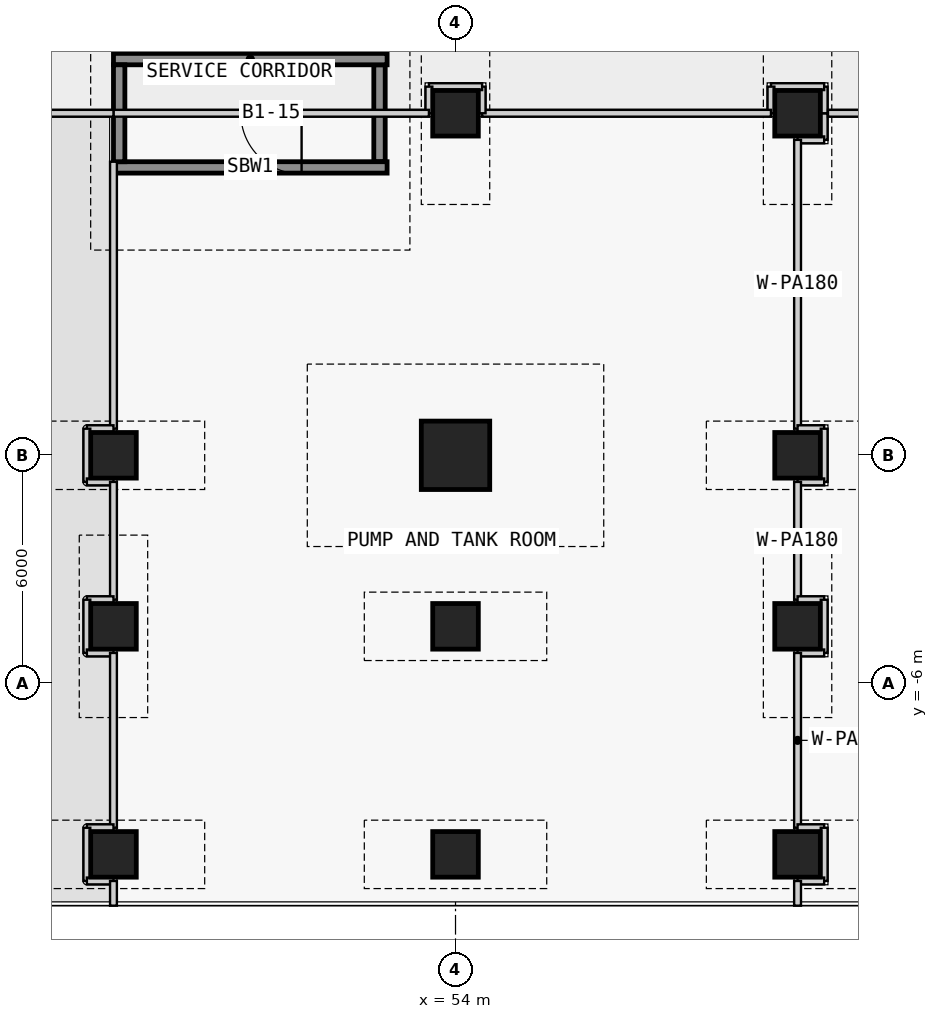
"""IFC4 building model, lengths in metres.
Left out: names, types, materials, properties, quantities, classifications, styles, units other than length and angle.
Written with IfcOpenShell. Run it as: python <this file> out.ifc"""

import sys

from ifc_helpers import new_model, si_unit, direction, frame, frame_2d, origin, origin_2d, place, context, subcontext, project, spatial, rectangle, extrude, element, fill, save


model = new_model("IFC4")
c1 = context("Model", 3, precision=1e-05, world=origin(), true_north=direction((0.0, 1.0)))
c2 = subcontext(c1, "Body", "Model", "MODEL_VIEW")
j1 = project(units=[si_unit("LENGTHUNIT", "METRE"), si_unit("PLANEANGLEUNIT", "RADIAN")], contexts=[c1])
p1 = place(None, origin())
s1 = spatial("IfcSite", under=j1, at=p1, CompositionType="ELEMENT")
p2 = place(p1, origin())
s2 = spatial("IfcBuilding", under=s1, at=p2, CompositionType="ELEMENT")
p3 = place(p2, frame((0.0, 0.0, -7.0)))
s3 = spatial("IfcBuildingStorey", under=s2, at=p3, CompositionType="ELEMENT", Elevation=-7.0)
for number, where, z_axis, x_axis in (
    (1, (45.0, -10.5, 0.0), (0.0, 0.0, 1.0), (1.0, 0.0, 0.0)),
    (2, (45.0, -4.5, 0.0), (0.0, 0.0, 1.0), (1.0, 0.0, 0.0)),
    (3, (45.0, 0.0, 0.0), (0.0, 0.0, 1.0), (1.0, 0.0, 0.0)),
    (4, (54.0, -10.5, 0.0), (0.0, 0.0, 1.0), (1.0, 0.0, 0.0)),
    (5, (54.0, -4.5, 0.0), (0.0, 0.0, 1.0), (1.0, 0.0, 0.0)),
):
    element("IfcColumn", number, at=place(p3, frame(where, z_axis=z_axis, x_axis=x_axis)), inside=s3, PredefinedType="COLUMN", context=c2, shape_type="SweptSolid", body=[
        extrude(rectangle(XDim=1.2, YDim=1.2, at=origin_2d()), origin(), (0.0, 0.0, 1.0), 7.0),
    ])
p4 = place(p3, frame((54.0, 0.0, 0.0), z_axis=(0.0, 0.0, 1.0), x_axis=(1.0, 0.0, 0.0)))
e6 = element("IfcColumn", 6, at=p4, inside=s3, PredefinedType="COLUMN", context=c2, shape_type="SweptSolid", body=[
    extrude(rectangle(XDim=1.8, YDim=1.8, at=origin_2d()), origin(), (0.0, 0.0, 1.0), 7.0),
])
for number, where, z_axis, x_axis in (
    (7, (54.0, 9.0, 0.0), (0.0, 0.0, 1.0), (1.0, 0.0, 0.0)),
    (8, (63.0, -10.5, 0.0), (0.0, 0.0, 1.0), (1.0, 0.0, 0.0)),
    (9, (63.0, -4.5, 0.0), (0.0, 0.0, 1.0), (1.0, 0.0, 0.0)),
    (10, (63.0, 0.0, 0.0), (0.0, 0.0, 1.0), (1.0, 0.0, 0.0)),
    (11, (63.0, 9.0, 0.0), (0.0, 0.0, 1.0), (1.0, 0.0, 0.0)),
):
    element("IfcColumn", number, at=place(p3, frame(where, z_axis=z_axis, x_axis=x_axis)), inside=s3, PredefinedType="COLUMN", context=c2, shape_type="SweptSolid", body=[
        extrude(rectangle(XDim=1.2, YDim=1.2, at=origin_2d()), origin(), (0.0, 0.0, 1.0), 7.0),
    ])
for number, where, z_axis, x_axis in (
    (12, (45.15, 7.725, 0.0), (0.0, 0.0, 1.0), (0.0, 1.0, 0.0)),
    (13, (52.0, 7.725, 0.0), (0.0, 0.0, 1.0), (0.0, 1.0, 0.0)),
):
    element("IfcWall", number, at=place(p3, frame(where, z_axis=z_axis, x_axis=x_axis)), inside=s3, PredefinedType="SHEAR", context=c2, shape_type="SweptSolid", body=[
        extrude(rectangle(XDim=2.55, YDim=0.3, at=frame_2d((1.275, 0.0))), origin(), (0.0, 0.0, 1.0), 6.55),
    ])
for number, where, z_axis, x_axis in (
    (14, (45.0, 7.575, 0.0), (0.0, 0.0, 1.0), (1.0, 0.0, 0.0)),
    (15, (45.0, 10.425, 0.0), (0.0, 0.0, 1.0), (1.0, 0.0, 0.0)),
):
    element("IfcWall", number, at=place(p3, frame(where, z_axis=z_axis, x_axis=x_axis)), inside=s3, PredefinedType="SHEAR", context=c2, shape_type="SweptSolid", body=[
        extrude(rectangle(XDim=7.2, YDim=0.3, at=frame_2d((3.6, 0.0))), origin(), (0.0, 0.0, 1.0), 6.55),
    ])
for number, where, z_axis, x_axis in (
    (16, (63.7, 9.0, 0.0), (0.0, 0.0, 1.0), (0.0, -1.0, 0.0)),
    (17, (63.7, 8.3, 0.0), (0.0, 0.0, 1.0), (-1.0, 0.0, 0.0)),
):
    element("IfcWall", number, at=place(p3, frame(where, z_axis=z_axis, x_axis=x_axis)), inside=s3, PredefinedType="PARTITIONING", context=c2, shape_type="SweptSolid", body=[
        extrude(rectangle(XDim=0.7, YDim=0.18, at=frame_2d((0.35, 0.0))), origin(), (0.0, 0.0, 1.0), 6.55),
    ])
p5 = place(p3, frame((63.0, 8.3, 0.0), z_axis=(0.0, 0.0, 1.0), x_axis=(0.0, -1.0, 0.0)))
e18 = element("IfcWall", 18, at=p5, inside=s3, PredefinedType="PARTITIONING", context=c2, shape_type="SweptSolid", body=[
    extrude(rectangle(XDim=7.6, YDim=0.18, at=frame_2d((3.8, 0.0))), origin(), (0.0, 0.0, 1.0), 6.55),
])
p6 = place(p3, frame((63.0, 0.7, 0.0), z_axis=(0.0, 0.0, 1.0), x_axis=(1.0, 0.0, 0.0)))
e19 = element("IfcWall", 19, at=p6, inside=s3, PredefinedType="PARTITIONING", context=c2, shape_type="SweptSolid", body=[
    extrude(rectangle(XDim=0.7, YDim=0.18, at=frame_2d((0.35, 0.0))), origin(), (0.0, 0.0, 1.0), 6.55),
])
p7 = place(p3, frame((63.7, 0.7, 0.0), z_axis=(0.0, 0.0, 1.0), x_axis=(0.0, -1.0, 0.0)))
e20 = element("IfcWall", 20, at=p7, inside=s3, PredefinedType="PARTITIONING", context=c2, shape_type="SweptSolid", body=[
    extrude(rectangle(XDim=1.4, YDim=0.18, at=frame_2d((0.7, 0.0))), origin(), (0.0, 0.0, 1.0), 6.55),
])
p8 = place(p3, frame((63.7, -0.7, 0.0), z_axis=(0.0, 0.0, 1.0), x_axis=(-1.0, 0.0, 0.0)))
e21 = element("IfcWall", 21, at=p8, inside=s3, PredefinedType="PARTITIONING", context=c2, shape_type="SweptSolid", body=[
    extrude(rectangle(XDim=0.7, YDim=0.18, at=frame_2d((0.35, 0.0))), origin(), (0.0, 0.0, 1.0), 6.55),
])
p9 = place(p3, frame((63.0, -0.7, 0.0), z_axis=(0.0, 0.0, 1.0), x_axis=(0.0, -1.0, 0.0)))
e22 = element("IfcWall", 22, at=p9, inside=s3, PredefinedType="PARTITIONING", context=c2, shape_type="SweptSolid", body=[
    extrude(rectangle(XDim=3.1, YDim=0.18, at=frame_2d((1.55, 0.0))), origin(), (0.0, 0.0, 1.0), 6.55),
])
p10 = place(p3, frame((63.0, -3.8, 0.0), z_axis=(0.0, 0.0, 1.0), x_axis=(1.0, 0.0, 0.0)))
e23 = element("IfcWall", 23, at=p10, inside=s3, PredefinedType="PARTITIONING", context=c2, shape_type="SweptSolid", body=[
    extrude(rectangle(XDim=0.7, YDim=0.18, at=frame_2d((0.35, 0.0))), origin(), (0.0, 0.0, 1.0), 6.55),
])
p11 = place(p3, frame((63.7, -3.8, 0.0), z_axis=(0.0, 0.0, 1.0), x_axis=(0.0, -1.0, 0.0)))
e24 = element("IfcWall", 24, at=p11, inside=s3, PredefinedType="PARTITIONING", context=c2, shape_type="SweptSolid", body=[
    extrude(rectangle(XDim=1.4, YDim=0.18, at=frame_2d((0.7, 0.0))), origin(), (0.0, 0.0, 1.0), 6.55),
])
p12 = place(p3, frame((63.7, -5.2, 0.0), z_axis=(0.0, 0.0, 1.0), x_axis=(-1.0, 0.0, 0.0)))
e25 = element("IfcWall", 25, at=p12, inside=s3, PredefinedType="PARTITIONING", context=c2, shape_type="SweptSolid", body=[
    extrude(rectangle(XDim=0.7, YDim=0.18, at=frame_2d((0.35, 0.0))), origin(), (0.0, 0.0, 1.0), 6.55),
])
p13 = place(p3, frame((63.0, -5.2, 0.0), z_axis=(0.0, 0.0, 1.0), x_axis=(0.0, -1.0, 0.0)))
e26 = element("IfcWall", 26, at=p13, inside=s3, PredefinedType="PARTITIONING", context=c2, shape_type="SweptSolid", body=[
    extrude(rectangle(XDim=4.6, YDim=0.18, at=frame_2d((2.3, 0.0))), origin(), (0.0, 0.0, 1.0), 6.55),
])
p14 = place(p3, frame((63.0, -9.8, 0.0), z_axis=(0.0, 0.0, 1.0), x_axis=(1.0, 0.0, 0.0)))
e27 = element("IfcWall", 27, at=p14, inside=s3, PredefinedType="PARTITIONING", context=c2, shape_type="SweptSolid", body=[
    extrude(rectangle(XDim=0.7, YDim=0.18, at=frame_2d((0.35, 0.0))), origin(), (0.0, 0.0, 1.0), 6.55),
])
p15 = place(p3, frame((63.7, -9.8, 0.0), z_axis=(0.0, 0.0, 1.0), x_axis=(0.0, -1.0, 0.0)))
e28 = element("IfcWall", 28, at=p15, inside=s3, PredefinedType="PARTITIONING", context=c2, shape_type="SweptSolid", body=[
    extrude(rectangle(XDim=1.4, YDim=0.18, at=frame_2d((0.7, 0.0))), origin(), (0.0, 0.0, 1.0), 6.55),
])
p16 = place(p3, frame((63.7, -11.2, 0.0), z_axis=(0.0, 0.0, 1.0), x_axis=(-1.0, 0.0, 0.0)))
e29 = element("IfcWall", 29, at=p16, inside=s3, PredefinedType="PARTITIONING", context=c2, shape_type="SweptSolid", body=[
    extrude(rectangle(XDim=0.7, YDim=0.18, at=frame_2d((0.35, 0.0))), origin(), (0.0, 0.0, 1.0), 6.55),
])
p17 = place(p3, frame((63.0, -11.2, 0.0), z_axis=(0.0, 0.0, 1.0), x_axis=(0.0, -1.0, 0.0)))
e30 = element("IfcWall", 30, at=p17, inside=s3, PredefinedType="PARTITIONING", context=c2, shape_type="SweptSolid", body=[
    extrude(rectangle(XDim=0.65, YDim=0.18, at=frame_2d((0.325, 0.0))), origin(), (0.0, 0.0, 1.0), 6.55),
])
p18 = place(p3, frame((45.0, 7.725, 0.0), z_axis=(0.0, 0.0, 1.0), x_axis=(0.0, -1.0, 0.0)))
e31 = element("IfcWall", 31, at=p18, inside=s3, PredefinedType="PARTITIONING", context=c2, shape_type="SweptSolid", body=[
    extrude(rectangle(XDim=7.025, YDim=0.18, at=frame_2d((3.513, 0.0))), origin(), (0.0, 0.0, 1.0), 6.55),
])
p19 = place(p3, frame((45.0, 0.7, 0.0), z_axis=(0.0, 0.0, 1.0), x_axis=(-1.0, 0.0, 0.0)))
e32 = element("IfcWall", 32, at=p19, inside=s3, PredefinedType="PARTITIONING", context=c2, shape_type="SweptSolid", body=[
    extrude(rectangle(XDim=0.7, YDim=0.18, at=frame_2d((0.35, 0.0))), origin(), (0.0, 0.0, 1.0), 6.55),
])
p20 = place(p3, frame((44.3, 0.7, 0.0), z_axis=(0.0, 0.0, 1.0), x_axis=(0.0, -1.0, 0.0)))
e33 = element("IfcWall", 33, at=p20, inside=s3, PredefinedType="PARTITIONING", context=c2, shape_type="SweptSolid", body=[
    extrude(rectangle(XDim=1.4, YDim=0.18, at=frame_2d((0.7, 0.0))), origin(), (0.0, 0.0, 1.0), 6.55),
])
p21 = place(p3, frame((44.3, -0.7, 0.0), z_axis=(0.0, 0.0, 1.0), x_axis=(1.0, 0.0, 0.0)))
e34 = element("IfcWall", 34, at=p21, inside=s3, PredefinedType="PARTITIONING", context=c2, shape_type="SweptSolid", body=[
    extrude(rectangle(XDim=0.7, YDim=0.18, at=frame_2d((0.35, 0.0))), origin(), (0.0, 0.0, 1.0), 6.55),
])
p22 = place(p3, frame((45.0, -0.7, 0.0), z_axis=(0.0, 0.0, 1.0), x_axis=(0.0, -1.0, 0.0)))
e35 = element("IfcWall", 35, at=p22, inside=s3, PredefinedType="PARTITIONING", context=c2, shape_type="SweptSolid", body=[
    extrude(rectangle(XDim=3.1, YDim=0.18, at=frame_2d((1.55, 0.0))), origin(), (0.0, 0.0, 1.0), 6.55),
])
p23 = place(p3, frame((45.0, -3.8, 0.0), z_axis=(0.0, 0.0, 1.0), x_axis=(-1.0, 0.0, 0.0)))
e36 = element("IfcWall", 36, at=p23, inside=s3, PredefinedType="PARTITIONING", context=c2, shape_type="SweptSolid", body=[
    extrude(rectangle(XDim=0.7, YDim=0.18, at=frame_2d((0.35, 0.0))), origin(), (0.0, 0.0, 1.0), 6.55),
])
p24 = place(p3, frame((44.3, -3.8, 0.0), z_axis=(0.0, 0.0, 1.0), x_axis=(0.0, -1.0, 0.0)))
e37 = element("IfcWall", 37, at=p24, inside=s3, PredefinedType="PARTITIONING", context=c2, shape_type="SweptSolid", body=[
    extrude(rectangle(XDim=1.4, YDim=0.18, at=frame_2d((0.7, 0.0))), origin(), (0.0, 0.0, 1.0), 6.55),
])
p25 = place(p3, frame((44.3, -5.2, 0.0), z_axis=(0.0, 0.0, 1.0), x_axis=(1.0, 0.0, 0.0)))
e38 = element("IfcWall", 38, at=p25, inside=s3, PredefinedType="PARTITIONING", context=c2, shape_type="SweptSolid", body=[
    extrude(rectangle(XDim=0.7, YDim=0.18, at=frame_2d((0.35, 0.0))), origin(), (0.0, 0.0, 1.0), 6.55),
])
p26 = place(p3, frame((45.0, -5.2, 0.0), z_axis=(0.0, 0.0, 1.0), x_axis=(0.0, -1.0, 0.0)))
e39 = element("IfcWall", 39, at=p26, inside=s3, PredefinedType="PARTITIONING", context=c2, shape_type="SweptSolid", body=[
    extrude(rectangle(XDim=4.6, YDim=0.18, at=frame_2d((2.3, 0.0))), origin(), (0.0, 0.0, 1.0), 6.55),
])
p27 = place(p3, frame((45.0, -9.8, 0.0), z_axis=(0.0, 0.0, 1.0), x_axis=(-1.0, 0.0, 0.0)))
e40 = element("IfcWall", 40, at=p27, inside=s3, PredefinedType="PARTITIONING", context=c2, shape_type="SweptSolid", body=[
    extrude(rectangle(XDim=0.7, YDim=0.18, at=frame_2d((0.35, 0.0))), origin(), (0.0, 0.0, 1.0), 6.55),
])
p28 = place(p3, frame((44.3, -9.8, 0.0), z_axis=(0.0, 0.0, 1.0), x_axis=(0.0, -1.0, 0.0)))
e41 = element("IfcWall", 41, at=p28, inside=s3, PredefinedType="PARTITIONING", context=c2, shape_type="SweptSolid", body=[
    extrude(rectangle(XDim=1.4, YDim=0.18, at=frame_2d((0.7, 0.0))), origin(), (0.0, 0.0, 1.0), 6.55),
])
p29 = place(p3, frame((44.3, -11.2, 0.0), z_axis=(0.0, 0.0, 1.0), x_axis=(1.0, 0.0, 0.0)))
e42 = element("IfcWall", 42, at=p29, inside=s3, PredefinedType="PARTITIONING", context=c2, shape_type="SweptSolid", body=[
    extrude(rectangle(XDim=0.7, YDim=0.18, at=frame_2d((0.35, 0.0))), origin(), (0.0, 0.0, 1.0), 6.55),
])
p30 = place(p3, frame((45.0, -11.2, 0.0), z_axis=(0.0, 0.0, 1.0), x_axis=(0.0, -1.0, 0.0)))
e43 = element("IfcWall", 43, at=p30, inside=s3, PredefinedType="PARTITIONING", context=c2, shape_type="SweptSolid", body=[
    extrude(rectangle(XDim=0.65, YDim=0.18, at=frame_2d((0.325, 0.0))), origin(), (0.0, 0.0, 1.0), 6.55),
])
p31 = place(p3, frame((63.7, 9.0, 0.0), z_axis=(0.0, 0.0, 1.0), x_axis=(0.0, 1.0, 0.0)))
e44 = element("IfcWall", 44, at=p31, inside=s3, PredefinedType="PARTITIONING", context=c2, shape_type="SweptSolid", body=[
    extrude(rectangle(XDim=0.7, YDim=0.18, at=frame_2d((0.35, 0.0))), origin(), (0.0, 0.0, 1.0), 6.55),
])
p32 = place(p3, frame((63.7, 9.7, 0.0), z_axis=(0.0, 0.0, 1.0), x_axis=(-1.0, 0.0, 0.0)))
e45 = element("IfcWall", 45, at=p32, inside=s3, PredefinedType="PARTITIONING", context=c2, shape_type="SweptSolid", body=[
    extrude(rectangle(XDim=1.4, YDim=0.18, at=frame_2d((0.7, 0.0))), origin(), (0.0, 0.0, 1.0), 6.55),
])
p33 = place(p3, frame((62.3, 9.7, 0.0), z_axis=(0.0, 0.0, 1.0), x_axis=(0.0, -1.0, 0.0)))
e46 = element("IfcWall", 46, at=p33, inside=s3, PredefinedType="PARTITIONING", context=c2, shape_type="SweptSolid", body=[
    extrude(rectangle(XDim=0.7, YDim=0.18, at=frame_2d((0.35, 0.0))), origin(), (0.0, 0.0, 1.0), 6.55),
])
p34 = place(p3, frame((62.3, 9.0, 0.0), z_axis=(0.0, 0.0, 1.0), x_axis=(-1.0, 0.0, 0.0)))
e47 = element("IfcWall", 47, at=p34, inside=s3, PredefinedType="PARTITIONING", context=c2, shape_type="SweptSolid", body=[
    extrude(rectangle(XDim=7.6, YDim=0.18, at=frame_2d((3.8, 0.0))), origin(), (0.0, 0.0, 1.0), 6.55),
])
p35 = place(p3, frame((54.7, 9.0, 0.0), z_axis=(0.0, 0.0, 1.0), x_axis=(0.0, 1.0, 0.0)))
e48 = element("IfcWall", 48, at=p35, inside=s3, PredefinedType="PARTITIONING", context=c2, shape_type="SweptSolid", body=[
    extrude(rectangle(XDim=0.7, YDim=0.18, at=frame_2d((0.35, 0.0))), origin(), (0.0, 0.0, 1.0), 6.55),
])
p36 = place(p3, frame((54.7, 9.7, 0.0), z_axis=(0.0, 0.0, 1.0), x_axis=(-1.0, 0.0, 0.0)))
e49 = element("IfcWall", 49, at=p36, inside=s3, PredefinedType="PARTITIONING", context=c2, shape_type="SweptSolid", body=[
    extrude(rectangle(XDim=1.4, YDim=0.18, at=frame_2d((0.7, 0.0))), origin(), (0.0, 0.0, 1.0), 6.55),
])
p37 = place(p3, frame((53.3, 9.7, 0.0), z_axis=(0.0, 0.0, 1.0), x_axis=(0.0, -1.0, 0.0)))
e50 = element("IfcWall", 50, at=p37, inside=s3, PredefinedType="PARTITIONING", context=c2, shape_type="SweptSolid", body=[
    extrude(rectangle(XDim=0.7, YDim=0.18, at=frame_2d((0.35, 0.0))), origin(), (0.0, 0.0, 1.0), 6.55),
])
p38 = place(p3, frame((53.3, 9.0, 0.0), z_axis=(0.0, 0.0, 1.0), x_axis=(-1.0, 0.0, 0.0)))
e51 = element("IfcWall", 51, at=p38, inside=s3, PredefinedType="PARTITIONING", context=c2, shape_type="SweptSolid", body=[
    extrude(rectangle(XDim=8.3, YDim=0.18, at=frame_2d((4.15, 0.0))), origin(), (0.0, 0.0, 1.0), 6.55),
])
p39 = place(p38, frame((3.35, 0.0, 0.0)))
e52 = element("IfcOpeningElement", 52, at=p39, cuts=e51, PredefinedType="OPENING", context=c2, shape_type="SweptSolid", body=[
    extrude(rectangle(XDim=1.6, YDim=2.4, at=frame_2d((0.8, 1.2))), frame((0.0, 0.1, 0.0), z_axis=(0.0, -1.0, 0.0), x_axis=(1.0, 0.0, 0.0)), (0.0, 0.0, 1.0), 0.2),
])
p40 = place(p3, frame((75.0, 9.0, 0.0), z_axis=(0.0, 0.0, 1.0), x_axis=(-1.0, 0.0, 0.0)))
e53 = element("IfcWall", 53, at=p40, inside=s3, PredefinedType="PARTITIONING", context=c2, shape_type="SweptSolid", body=[
    extrude(rectangle(XDim=11.2, YDim=0.18, at=frame_2d((5.6, 0.0))), origin(), (0.0, 0.0, 1.0), 6.55),
])
p41 = place(p40, frame((4.85, 0.0, 0.0)))
e54 = element("IfcOpeningElement", 54, at=p41, cuts=e53, PredefinedType="OPENING", context=c2, shape_type="SweptSolid", body=[
    extrude(rectangle(XDim=1.6, YDim=2.4, at=frame_2d((0.8, 1.2))), frame((0.0, 0.1, 0.0), z_axis=(0.0, -1.0, 0.0), x_axis=(1.0, 0.0, 0.0)), (0.0, 0.0, 1.0), 0.2),
])
p42 = place(p3, frame((45.0, 9.0, 0.0), z_axis=(0.0, 0.0, 1.0), x_axis=(-1.0, 0.0, 0.0)))
e55 = element("IfcWall", 55, at=p42, inside=s3, PredefinedType="PARTITIONING", context=c2, shape_type="SweptSolid", body=[
    extrude(rectangle(XDim=8.3, YDim=0.18, at=frame_2d((4.15, 0.0))), origin(), (0.0, 0.0, 1.0), 6.55),
])
p43 = place(p39, origin())
e56 = element("IfcDoor", 56, at=p43, inside=s3, OperationType="SINGLE_SWING_LEFT", PredefinedType="DOOR", context=c2, shape_type="SweptSolid", body=[
    extrude(rectangle(XDim=1.6, YDim=2.4, at=frame_2d((0.8, 1.2))), frame((0.0, 0.025, 0.0), z_axis=(0.0, -1.0, 0.0), x_axis=(1.0, 0.0, 0.0)), (0.0, 0.0, 1.0), 0.05),
])
fill(e52, e56)
save(model, sys.argv[1])
